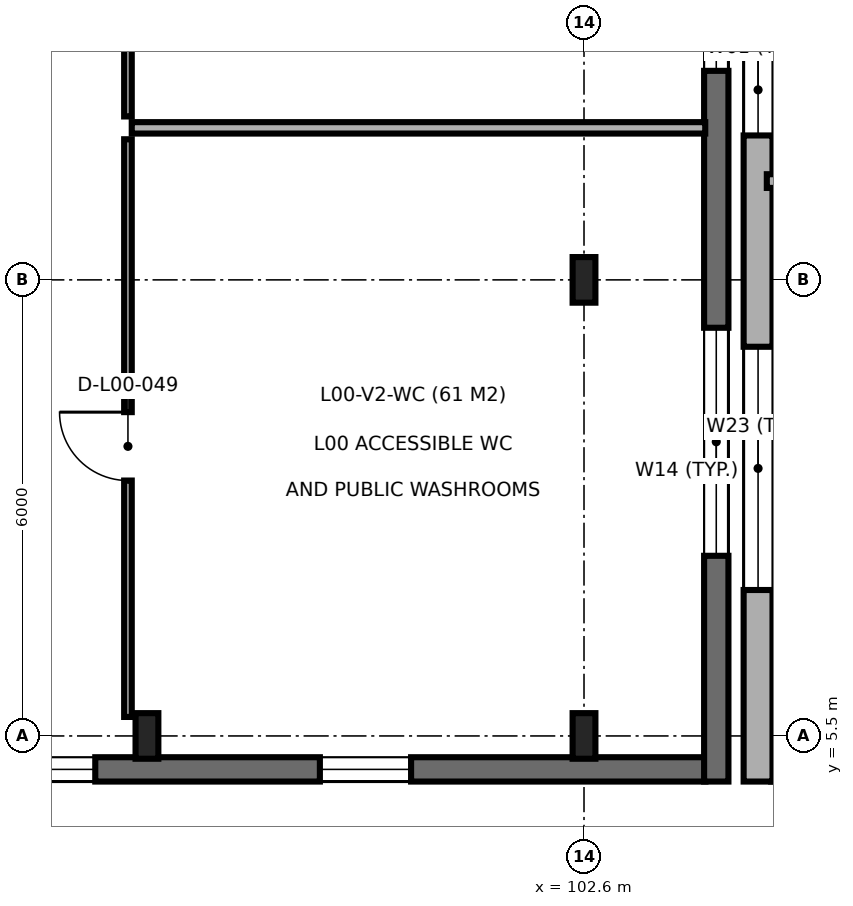
"""IFC4 building model, lengths in metres.
Left out: names, types, materials, properties, quantities, classifications, styles, units other than length and angle.
Written with IfcOpenShell. Run it as: python <this file> out.ifc"""

import sys

from ifc_helpers import new_model, si_unit, direction, frame, frame_2d, origin, origin_2d, place, context, subcontext, project, spatial, rectangle, i_section, extrude, element, fill, save


model = new_model("IFC4")
c1 = context("Model", 3, precision=1e-05, world=origin(), true_north=direction((0.0, 1.0)))
c2 = subcontext(c1, "Body", "Model", "MODEL_VIEW")
j1 = project(units=[si_unit("LENGTHUNIT", "METRE"), si_unit("PLANEANGLEUNIT", "RADIAN")], contexts=[c1])
p1 = place(None, origin())
s1 = spatial("IfcSite", under=j1, at=p1, CompositionType="ELEMENT")
p2 = place(p1, origin())
s2 = spatial("IfcBuilding", under=s1, at=p2, CompositionType="ELEMENT")
p3 = place(p2, origin())
s3 = spatial("IfcBuildingStorey", under=s2, at=p3, CompositionType="ELEMENT", Elevation=0.0)
for number, where, z_axis, x_axis in (
    (1, (96.85, 5.5, 0.0), (0.0, 0.0, 1.0), (1.0, 0.0, 0.0)),
    (2, (102.6, 5.5, 0.0), (0.0, 0.0, 1.0), (1.0, 0.0, 0.0)),
    (3, (102.6, 11.5, 0.0), (0.0, 0.0, 1.0), (1.0, 0.0, 0.0)),
):
    element("IfcColumn", number, at=place(p3, frame(where, z_axis=z_axis, x_axis=x_axis)), inside=s3, PredefinedType="COLUMN", context=c2, shape_type="SweptSolid", body=[
        extrude(i_section(OverallWidth=0.3, OverallDepth=0.6, WebThickness=0.015, FlangeThickness=0.03, FilletRadius=0.027, at=origin_2d()), origin(), (0.0, 0.0, 1.0), 4.8),
    ])
p4 = place(p3, frame((105.062, 5.09, 0.0), z_axis=(0.0, 0.0, 1.0), x_axis=(1.0, 0.0, 0.0)))
e4 = element("IfcWall", 4, at=p4, inside=s3, PredefinedType="SOLIDWALL", context=c2, shape_type="SweptSolid", body=[
    extrude(rectangle(XDim=59.338, YDim=0.38, at=frame_2d((29.669, 0.0))), origin(), (0.0, 0.0, 1.0), 4.55),
])
p5 = place(p4, frame((4.538, 0.0, 0.0)))
e5 = element("IfcOpeningElement", 5, at=p5, cuts=e4, PredefinedType="OPENING", context=c2, shape_type="SweptSolid", body=[
    extrude(rectangle(XDim=2.0, YDim=2.4, at=frame_2d((1.0, 1.2))), frame((0.0, 0.2, 0.0), z_axis=(0.0, -1.0, 0.0), x_axis=(1.0, 0.0, 0.0)), (0.0, 0.0, 1.0), 0.4),
])
p6 = place(p4, frame((20.538, 0.0, 0.0)))
e6 = element("IfcOpeningElement", 6, at=p6, cuts=e4, PredefinedType="OPENING", context=c2, shape_type="SweptSolid", body=[
    extrude(rectangle(XDim=2.0, YDim=2.4, at=frame_2d((1.0, 1.2))), frame((0.0, 0.2, 0.0), z_axis=(0.0, -1.0, 0.0), x_axis=(1.0, 0.0, 0.0)), (0.0, 0.0, 1.0), 0.4),
])
p7 = place(p4, frame((12.538, 0.0, 0.0)))
e7 = element("IfcOpeningElement", 7, at=p7, cuts=e4, PredefinedType="OPENING", context=c2, shape_type="SweptSolid", body=[
    extrude(rectangle(XDim=2.0, YDim=2.4, at=frame_2d((1.0, 1.2))), frame((0.0, 0.2, 0.0), z_axis=(0.0, -1.0, 0.0), x_axis=(1.0, 0.0, 0.0)), (0.0, 0.0, 1.0), 0.4),
])
p8 = place(p4, frame((2.553, 0.0, 0.9)))
e8 = element("IfcOpeningElement", 8, at=p8, cuts=e4, PredefinedType="OPENING", context=c2, shape_type="SweptSolid", body=[
    extrude(rectangle(XDim=0.9, YDim=1.8, at=frame_2d((0.45, 0.9))), frame((0.0, 0.2, 0.0), z_axis=(0.0, -1.0, 0.0), x_axis=(1.0, 0.0, 0.0)), (0.0, 0.0, 1.0), 0.4),
])
p9 = place(p4, frame((7.623, 0.0, 0.9)))
e9 = element("IfcOpeningElement", 9, at=p9, cuts=e4, PredefinedType="OPENING", context=c2, shape_type="SweptSolid", body=[
    extrude(rectangle(XDim=0.9, YDim=1.8, at=frame_2d((0.45, 0.9))), frame((0.0, 0.2, 0.0), z_axis=(0.0, -1.0, 0.0), x_axis=(1.0, 0.0, 0.0)), (0.0, 0.0, 1.0), 0.4),
])
p10 = place(p4, frame((10.633, 0.0, 0.9)))
e10 = element("IfcOpeningElement", 10, at=p10, cuts=e4, PredefinedType="OPENING", context=c2, shape_type="SweptSolid", body=[
    extrude(rectangle(XDim=0.9, YDim=1.8, at=frame_2d((0.45, 0.9))), frame((0.0, 0.2, 0.0), z_axis=(0.0, -1.0, 0.0), x_axis=(1.0, 0.0, 0.0)), (0.0, 0.0, 1.0), 0.4),
])
p11 = place(p4, frame((15.623, 0.0, 0.9)))
e11 = element("IfcOpeningElement", 11, at=p11, cuts=e4, PredefinedType="OPENING", context=c2, shape_type="SweptSolid", body=[
    extrude(rectangle(XDim=0.9, YDim=1.8, at=frame_2d((0.45, 0.9))), frame((0.0, 0.2, 0.0), z_axis=(0.0, -1.0, 0.0), x_axis=(1.0, 0.0, 0.0)), (0.0, 0.0, 1.0), 0.4),
])
p12 = place(p4, frame((18.553, 0.0, 0.9)))
e12 = element("IfcOpeningElement", 12, at=p12, cuts=e4, PredefinedType="OPENING", context=c2, shape_type="SweptSolid", body=[
    extrude(rectangle(XDim=0.9, YDim=1.8, at=frame_2d((0.45, 0.9))), frame((0.0, 0.2, 0.0), z_axis=(0.0, -1.0, 0.0), x_axis=(1.0, 0.0, 0.0)), (0.0, 0.0, 1.0), 0.4),
])
p13 = place(p4, frame((29.158, 0.0, 0.9)))
e13 = element("IfcOpeningElement", 13, at=p13, cuts=e4, PredefinedType="OPENING", context=c2, shape_type="SweptSolid", body=[
    extrude(rectangle(XDim=0.9, YDim=1.8, at=frame_2d((0.45, 0.9))), frame((0.0, 0.2, 0.0), z_axis=(0.0, -1.0, 0.0), x_axis=(1.0, 0.0, 0.0)), (0.0, 0.0, 1.0), 0.4),
])
p14 = place(p4, frame((45.098, 0.0, 0.9)))
e14 = element("IfcOpeningElement", 14, at=p14, cuts=e4, PredefinedType="OPENING", context=c2, shape_type="SweptSolid", body=[
    extrude(rectangle(XDim=0.9, YDim=1.8, at=frame_2d((0.45, 0.9))), frame((0.0, 0.2, 0.0), z_axis=(0.0, -1.0, 0.0), x_axis=(1.0, 0.0, 0.0)), (0.0, 0.0, 1.0), 0.4),
])
p15 = place(p4, frame((50.358, 0.0, 0.9)))
e15 = element("IfcOpeningElement", 15, at=p15, cuts=e4, PredefinedType="OPENING", context=c2, shape_type="SweptSolid", body=[
    extrude(rectangle(XDim=0.9, YDim=1.8, at=frame_2d((0.45, 0.9))), frame((0.0, 0.2, 0.0), z_axis=(0.0, -1.0, 0.0), x_axis=(1.0, 0.0, 0.0)), (0.0, 0.0, 1.0), 0.4),
])
p16 = place(p4, frame((54.968, 0.0, 0.9)))
e16 = element("IfcOpeningElement", 16, at=p16, cuts=e4, PredefinedType="OPENING", context=c2, shape_type="SweptSolid", body=[
    extrude(rectangle(XDim=0.9, YDim=1.8, at=frame_2d((0.45, 0.9))), frame((0.0, 0.2, 0.0), z_axis=(0.0, -1.0, 0.0), x_axis=(1.0, 0.0, 0.0)), (0.0, 0.0, 1.0), 0.4),
])
p17 = place(p3, frame((104.89, 23.5, 0.0), z_axis=(0.0, 0.0, 1.0), x_axis=(0.0, -1.0, 0.0)))
e17 = element("IfcWall", 17, at=p17, inside=s3, PredefinedType="SOLIDWALL", context=c2, shape_type="SweptSolid", body=[
    extrude(rectangle(XDim=18.6, YDim=0.38, at=frame_2d((9.3, 0.0))), origin(), (0.0, 0.0, 1.0), 4.55),
])
p18 = place(p17, frame((1.49, 0.0, 0.9)))
e18 = element("IfcOpeningElement", 18, at=p18, cuts=e17, PredefinedType="OPENING", context=c2, shape_type="SweptSolid", body=[
    extrude(rectangle(XDim=1.8, YDim=1.5, at=frame_2d((0.9, 0.75))), frame((0.0, 0.2, 0.0), z_axis=(0.0, -1.0, 0.0), x_axis=(1.0, 0.0, 0.0)), (0.0, 0.0, 1.0), 0.4),
])
p19 = place(p17, frame((5.77, 0.0, 0.9)))
e19 = element("IfcOpeningElement", 19, at=p19, cuts=e17, PredefinedType="OPENING", context=c2, shape_type="SweptSolid", body=[
    extrude(rectangle(XDim=1.2, YDim=2.4, at=frame_2d((0.6, 1.2))), frame((0.0, 0.2, 0.0), z_axis=(0.0, -1.0, 0.0), x_axis=(1.0, 0.0, 0.0)), (0.0, 0.0, 1.0), 0.4),
])
p20 = place(p17, frame((8.9, 0.0, 0.9)))
e20 = element("IfcOpeningElement", 20, at=p20, cuts=e17, PredefinedType="OPENING", context=c2, shape_type="SweptSolid", body=[
    extrude(rectangle(XDim=1.2, YDim=1.8, at=frame_2d((0.6, 0.9))), frame((0.0, 0.2, 0.0), z_axis=(0.0, -1.0, 0.0), x_axis=(1.0, 0.0, 0.0)), (0.0, 0.0, 1.0), 0.4),
])
p21 = place(p17, frame((12.88, 0.0, 0.9)))
e21 = element("IfcOpeningElement", 21, at=p21, cuts=e17, PredefinedType="OPENING", context=c2, shape_type="SweptSolid", body=[
    extrude(rectangle(XDim=3.2, YDim=2.4, at=frame_2d((1.6, 1.2))), frame((0.0, 0.2, 0.0), z_axis=(0.0, -1.0, 0.0), x_axis=(1.0, 0.0, 0.0)), (0.0, 0.0, 1.0), 0.4),
])
p22 = place(p3, frame((55.002, 5.06, 0.0), z_axis=(0.0, 0.0, 1.0), x_axis=(1.0, 0.0, 0.0)))
e22 = element("IfcWall", 22, at=p22, inside=s3, PredefinedType="SHEAR", context=c2, shape_type="SweptSolid", body=[
    extrude(rectangle(XDim=49.196, YDim=0.32, at=frame_2d((24.598, 0.0))), origin(), (0.0, 0.0, 1.0), 4.55),
])
p23 = place(p22, frame((19.998, 0.0, 0.0)))
e23 = element("IfcOpeningElement", 23, at=p23, cuts=e22, PredefinedType="OPENING", context=c2, shape_type="SweptSolid", body=[
    extrude(rectangle(XDim=2.0, YDim=2.4, at=frame_2d((1.0, 1.2))), frame((0.0, 0.17, 0.0), z_axis=(0.0, -1.0, 0.0), x_axis=(1.0, 0.0, 0.0)), (0.0, 0.0, 1.0), 0.34),
])
p24 = place(p22, frame((8.283, 0.0, 0.9)))
e24 = element("IfcOpeningElement", 24, at=p24, cuts=e22, PredefinedType="OPENING", context=c2, shape_type="SweptSolid", body=[
    extrude(rectangle(XDim=2.4, YDim=1.8, at=frame_2d((1.2, 0.9))), frame((0.0, 0.17, 0.0), z_axis=(0.0, -1.0, 0.0), x_axis=(1.0, 0.0, 0.0)), (0.0, 0.0, 1.0), 0.34),
])
p25 = place(p22, frame((13.898, 0.0, 0.9)))
e25 = element("IfcOpeningElement", 25, at=p25, cuts=e22, PredefinedType="OPENING", context=c2, shape_type="SweptSolid", body=[
    extrude(rectangle(XDim=0.9, YDim=1.8, at=frame_2d((0.45, 0.9))), frame((0.0, 0.17, 0.0), z_axis=(0.0, -1.0, 0.0), x_axis=(1.0, 0.0, 0.0)), (0.0, 0.0, 1.0), 0.34),
])
p26 = place(p22, frame((25.348, 0.0, 0.9)))
e26 = element("IfcOpeningElement", 26, at=p26, cuts=e22, PredefinedType="OPENING", context=c2, shape_type="SweptSolid", body=[
    extrude(rectangle(XDim=1.5, YDim=2.1, at=frame_2d((0.75, 1.05))), frame((0.0, 0.17, 0.0), z_axis=(0.0, -1.0, 0.0), x_axis=(1.0, 0.0, 0.0)), (0.0, 0.0, 1.0), 0.34),
])
p27 = place(p22, frame((28.373, 0.0, 0.9)))
e27 = element("IfcOpeningElement", 27, at=p27, cuts=e22, PredefinedType="OPENING", context=c2, shape_type="SweptSolid", body=[
    extrude(rectangle(XDim=1.2, YDim=1.8, at=frame_2d((0.6, 0.9))), frame((0.0, 0.17, 0.0), z_axis=(0.0, -1.0, 0.0), x_axis=(1.0, 0.0, 0.0)), (0.0, 0.0, 1.0), 0.34),
])
p28 = place(p22, frame((32.518, 0.0, 0.9)))
e28 = element("IfcOpeningElement", 28, at=p28, cuts=e22, PredefinedType="OPENING", context=c2, shape_type="SweptSolid", body=[
    extrude(rectangle(XDim=1.8, YDim=2.1, at=frame_2d((0.9, 1.05))), frame((0.0, 0.17, 0.0), z_axis=(0.0, -1.0, 0.0), x_axis=(1.0, 0.0, 0.0)), (0.0, 0.0, 1.0), 0.34),
])
p29 = place(p22, frame((37.248, 0.0, 0.9)))
e29 = element("IfcOpeningElement", 29, at=p29, cuts=e22, PredefinedType="OPENING", context=c2, shape_type="SweptSolid", body=[
    extrude(rectangle(XDim=1.2, YDim=1.5, at=frame_2d((0.6, 0.75))), frame((0.0, 0.17, 0.0), z_axis=(0.0, -1.0, 0.0), x_axis=(1.0, 0.0, 0.0)), (0.0, 0.0, 1.0), 0.34),
])
p30 = place(p22, frame((40.268, 0.0, 0.9)))
e30 = element("IfcOpeningElement", 30, at=p30, cuts=e22, PredefinedType="OPENING", context=c2, shape_type="SweptSolid", body=[
    extrude(rectangle(XDim=0.9, YDim=1.8, at=frame_2d((0.45, 0.9))), frame((0.0, 0.17, 0.0), z_axis=(0.0, -1.0, 0.0), x_axis=(1.0, 0.0, 0.0)), (0.0, 0.0, 1.0), 0.34),
])
p31 = place(p22, frame((44.123, 0.0, 0.9)))
e31 = element("IfcOpeningElement", 31, at=p31, cuts=e22, PredefinedType="OPENING", context=c2, shape_type="SweptSolid", body=[
    extrude(rectangle(XDim=1.2, YDim=2.4, at=frame_2d((0.6, 1.2))), frame((0.0, 0.17, 0.0), z_axis=(0.0, -1.0, 0.0), x_axis=(1.0, 0.0, 0.0)), (0.0, 0.0, 1.0), 0.34),
])
p32 = place(p3, frame((104.34, 4.9, 0.0), z_axis=(0.0, 0.0, 1.0), x_axis=(0.0, 1.0, 0.0)))
e32 = element("IfcWall", 32, at=p32, inside=s3, PredefinedType="SHEAR", context=c2, shape_type="SweptSolid", body=[
    extrude(rectangle(XDim=36.6, YDim=0.32, at=frame_2d((18.3, 0.0))), origin(), (0.0, 0.0, 1.0), 4.55),
])
p33 = place(p32, frame((2.97, 0.0, 0.9)))
e33 = element("IfcOpeningElement", 33, at=p33, cuts=e32, PredefinedType="OPENING", context=c2, shape_type="SweptSolid", body=[
    extrude(rectangle(XDim=3.0, YDim=2.1, at=frame_2d((1.5, 1.05))), frame((0.0, 0.17, 0.0), z_axis=(0.0, -1.0, 0.0), x_axis=(1.0, 0.0, 0.0)), (0.0, 0.0, 1.0), 0.34),
])
p34 = place(p32, frame((9.35, 0.0, 0.9)))
e34 = element("IfcOpeningElement", 34, at=p34, cuts=e32, PredefinedType="OPENING", context=c2, shape_type="SweptSolid", body=[
    extrude(rectangle(XDim=1.5, YDim=1.5, at=frame_2d((0.75, 0.75))), frame((0.0, 0.17, 0.0), z_axis=(0.0, -1.0, 0.0), x_axis=(1.0, 0.0, 0.0)), (0.0, 0.0, 1.0), 0.34),
])
p35 = place(p32, frame((13.9, 0.0, 0.9)))
e35 = element("IfcOpeningElement", 35, at=p35, cuts=e32, PredefinedType="OPENING", context=c2, shape_type="SweptSolid", body=[
    extrude(rectangle(XDim=2.4, YDim=1.5, at=frame_2d((1.2, 0.75))), frame((0.0, 0.17, 0.0), z_axis=(0.0, -1.0, 0.0), x_axis=(1.0, 0.0, 0.0)), (0.0, 0.0, 1.0), 0.34),
])
p36 = place(p32, frame((20.625, 0.0, 0.9)))
e36 = element("IfcOpeningElement", 36, at=p36, cuts=e32, PredefinedType="OPENING", context=c2, shape_type="SweptSolid", body=[
    extrude(rectangle(XDim=1.6, YDim=2.4, at=frame_2d((0.8, 1.2))), frame((0.0, 0.17, 0.0), z_axis=(0.0, -1.0, 0.0), x_axis=(1.0, 0.0, 0.0)), (0.0, 0.0, 1.0), 0.34),
])
p37 = place(p32, frame((24.295, 0.0, 0.9)))
e37 = element("IfcOpeningElement", 37, at=p37, cuts=e32, PredefinedType="OPENING", context=c2, shape_type="SweptSolid", body=[
    extrude(rectangle(XDim=2.6, YDim=2.4, at=frame_2d((1.3, 1.2))), frame((0.0, 0.17, 0.0), z_axis=(0.0, -1.0, 0.0), x_axis=(1.0, 0.0, 0.0)), (0.0, 0.0, 1.0), 0.34),
])
p38 = place(p32, frame((29.315, 0.0, 0.9)))
e38 = element("IfcOpeningElement", 38, at=p38, cuts=e32, PredefinedType="OPENING", context=c2, shape_type="SweptSolid", body=[
    extrude(rectangle(XDim=0.9, YDim=1.8, at=frame_2d((0.45, 0.9))), frame((0.0, 0.17, 0.0), z_axis=(0.0, -1.0, 0.0), x_axis=(1.0, 0.0, 0.0)), (0.0, 0.0, 1.0), 0.34),
])
p39 = place(p32, frame((32.235, 0.0, 0.9)))
e39 = element("IfcOpeningElement", 39, at=p39, cuts=e32, PredefinedType="OPENING", context=c2, shape_type="SweptSolid", body=[
    extrude(rectangle(XDim=3.4, YDim=1.95, at=frame_2d((1.7, 0.975))), frame((0.0, 0.17, 0.0), z_axis=(0.0, -1.0, 0.0), x_axis=(1.0, 0.0, 0.0)), (0.0, 0.0, 1.0), 0.34),
])
p40 = place(p3, frame((105.005, 12.8, 0.0), z_axis=(0.0, 0.0, 1.0), x_axis=(1.0, 0.0, 0.0)))
e40 = element("IfcWall", 40, at=p40, inside=s3, PredefinedType="PARTITIONING", context=c2, shape_type="SweptSolid", body=[
    extrude(rectangle(XDim=34.495, YDim=0.18, at=frame_2d((17.248, 0.0))), origin(), (0.0, 0.0, 1.0), 4.55),
])
p41 = place(p40, frame((6.011, 0.0, 0.0)))
e41 = element("IfcOpeningElement", 41, at=p41, cuts=e40, PredefinedType="OPENING", context=c2, shape_type="SweptSolid", body=[
    extrude(rectangle(XDim=1.1, YDim=2.15, at=frame_2d((0.55, 1.075))), frame((0.0, 0.1, 0.0), z_axis=(0.0, -1.0, 0.0), x_axis=(1.0, 0.0, 0.0)), (0.0, 0.0, 1.0), 0.2),
])
p42 = place(p40, frame((11.548, 0.0, 0.0)))
e42 = element("IfcOpeningElement", 42, at=p42, cuts=e40, PredefinedType="OPENING", context=c2, shape_type="SweptSolid", body=[
    extrude(rectangle(XDim=1.5, YDim=2.2, at=frame_2d((0.75, 1.1))), frame((0.0, 0.1, 0.0), z_axis=(0.0, -1.0, 0.0), x_axis=(1.0, 0.0, 0.0)), (0.0, 0.0, 1.0), 0.2),
])
p43 = place(p40, frame((27.548, 0.0, 0.0)))
e43 = element("IfcOpeningElement", 43, at=p43, cuts=e40, PredefinedType="OPENING", context=c2, shape_type="SweptSolid", body=[
    extrude(rectangle(XDim=0.9, YDim=2.1, at=frame_2d((0.45, 1.05))), frame((0.0, 0.1, 0.0), z_axis=(0.0, -1.0, 0.0), x_axis=(1.0, 0.0, 0.0)), (0.0, 0.0, 1.0), 0.2),
])
p44 = place(p3, frame((96.65, 13.5, 0.0), z_axis=(0.0, 0.0, 1.0), x_axis=(1.0, 0.0, 0.0)))
e44 = element("IfcWall", 44, at=p44, inside=s3, PredefinedType="PARTITIONING", context=c2, shape_type="SweptSolid", body=[
    extrude(rectangle(XDim=7.545, YDim=0.15, at=frame_2d((3.772, 0.0))), origin(), (0.0, 0.0, 1.0), 4.55),
])
p45 = place(p3, frame((96.6, 5.75, 0.0), z_axis=(0.0, 0.0, 1.0), x_axis=(0.0, 1.0, 0.0)))
e45 = element("IfcWall", 45, at=p45, inside=s3, PredefinedType="PARTITIONING", context=c2, shape_type="SweptSolid", body=[
    extrude(rectangle(XDim=7.6, YDim=0.1, at=frame_2d((3.8, 0.0))), origin(), (0.0, 0.0, 1.0), 4.55),
])
p46 = place(p45, frame((3.11, 0.0, 0.0)))
e46 = element("IfcOpeningElement", 46, at=p46, cuts=e45, PredefinedType="OPENING", context=c2, shape_type="SweptSolid", body=[
    extrude(rectangle(XDim=0.9, YDim=2.1, at=frame_2d((0.45, 1.05))), frame((0.0, 0.06, 0.0), z_axis=(0.0, -1.0, 0.0), x_axis=(1.0, 0.0, 0.0)), (0.0, 0.0, 1.0), 0.12),
])
p47 = place(p3, frame((96.6, 13.65, 0.0), z_axis=(0.0, 0.0, 1.0), x_axis=(0.0, 1.0, 0.0)))
e47 = element("IfcWall", 47, at=p47, inside=s3, PredefinedType="PARTITIONING", context=c2, shape_type="SweptSolid", body=[
    extrude(rectangle(XDim=10.2, YDim=0.1, at=frame_2d((5.1, 0.0))), origin(), (0.0, 0.0, 1.0), 4.55),
])
p48 = place(p47, frame((4.65, 0.0, 0.0)))
e48 = element("IfcOpeningElement", 48, at=p48, cuts=e47, PredefinedType="OPENING", context=c2, shape_type="SweptSolid", body=[
    extrude(rectangle(XDim=0.9, YDim=2.1, at=frame_2d((0.45, 1.05))), frame((0.0, 0.06, 0.0), z_axis=(0.0, -1.0, 0.0), x_axis=(1.0, 0.0, 0.0)), (0.0, 0.0, 1.0), 0.12),
])
p49 = place(p20, origin())
e49 = element("IfcWindow", 49, at=p49, inside=s3, PartitioningType="SINGLE_PANEL", PredefinedType="WINDOW", context=c2, shape_type="SweptSolid", body=[
    extrude(rectangle(XDim=1.2, YDim=1.8, at=frame_2d((0.6, 0.9))), frame((0.0, 0.03, 0.0), z_axis=(0.0, -1.0, 0.0), x_axis=(1.0, 0.0, 0.0)), (0.0, 0.0, 1.0), 0.06),
])
fill(e20, e49)
p50 = place(p21, origin())
e50 = element("IfcWindow", 50, at=p50, inside=s3, PartitioningType="SINGLE_PANEL", PredefinedType="WINDOW", context=c2, shape_type="SweptSolid", body=[
    extrude(rectangle(XDim=3.2, YDim=2.4, at=frame_2d((1.6, 1.2))), frame((0.0, 0.03, 0.0), z_axis=(0.0, -1.0, 0.0), x_axis=(1.0, 0.0, 0.0)), (0.0, 0.0, 1.0), 0.06),
])
fill(e21, e50)
p51 = place(p30, origin())
e51 = element("IfcWindow", 51, at=p51, inside=s3, PartitioningType="SINGLE_PANEL", PredefinedType="WINDOW", context=c2, shape_type="SweptSolid", body=[
    extrude(rectangle(XDim=0.9, YDim=1.8, at=frame_2d((0.45, 0.9))), frame((0.0, 0.03, 0.0), z_axis=(0.0, -1.0, 0.0), x_axis=(1.0, 0.0, 0.0)), (0.0, 0.0, 1.0), 0.06),
])
fill(e30, e51)
p52 = place(p31, origin())
e52 = element("IfcWindow", 52, at=p52, inside=s3, PartitioningType="SINGLE_PANEL", PredefinedType="WINDOW", context=c2, shape_type="SweptSolid", body=[
    extrude(rectangle(XDim=1.2, YDim=2.4, at=frame_2d((0.6, 1.2))), frame((0.0, 0.03, 0.0), z_axis=(0.0, -1.0, 0.0), x_axis=(1.0, 0.0, 0.0)), (0.0, 0.0, 1.0), 0.06),
])
fill(e31, e52)
p53 = place(p33, origin())
e53 = element("IfcWindow", 53, at=p53, inside=s3, PartitioningType="SINGLE_PANEL", PredefinedType="WINDOW", context=c2, shape_type="SweptSolid", body=[
    extrude(rectangle(XDim=3.0, YDim=2.1, at=frame_2d((1.5, 1.05))), frame((0.0, 0.03, 0.0), z_axis=(0.0, -1.0, 0.0), x_axis=(1.0, 0.0, 0.0)), (0.0, 0.0, 1.0), 0.06),
])
fill(e33, e53)
p54 = place(p34, origin())
e54 = element("IfcWindow", 54, at=p54, inside=s3, PartitioningType="SINGLE_PANEL", PredefinedType="WINDOW", context=c2, shape_type="SweptSolid", body=[
    extrude(rectangle(XDim=1.5, YDim=1.5, at=frame_2d((0.75, 0.75))), frame((0.0, 0.03, 0.0), z_axis=(0.0, -1.0, 0.0), x_axis=(1.0, 0.0, 0.0)), (0.0, 0.0, 1.0), 0.06),
])
fill(e34, e54)
p55 = place(p46, origin())
e55 = element("IfcDoor", 55, at=p55, inside=s3, OperationType="SINGLE_SWING_RIGHT", PredefinedType="DOOR", context=c2, shape_type="SweptSolid", body=[
    extrude(rectangle(XDim=0.9, YDim=2.1, at=frame_2d((0.45, 1.05))), frame((0.0, 0.025, 0.0), z_axis=(0.0, -1.0, 0.0), x_axis=(1.0, 0.0, 0.0)), (0.0, 0.0, 1.0), 0.05),
])
fill(e46, e55)
save(model, sys.argv[1])
